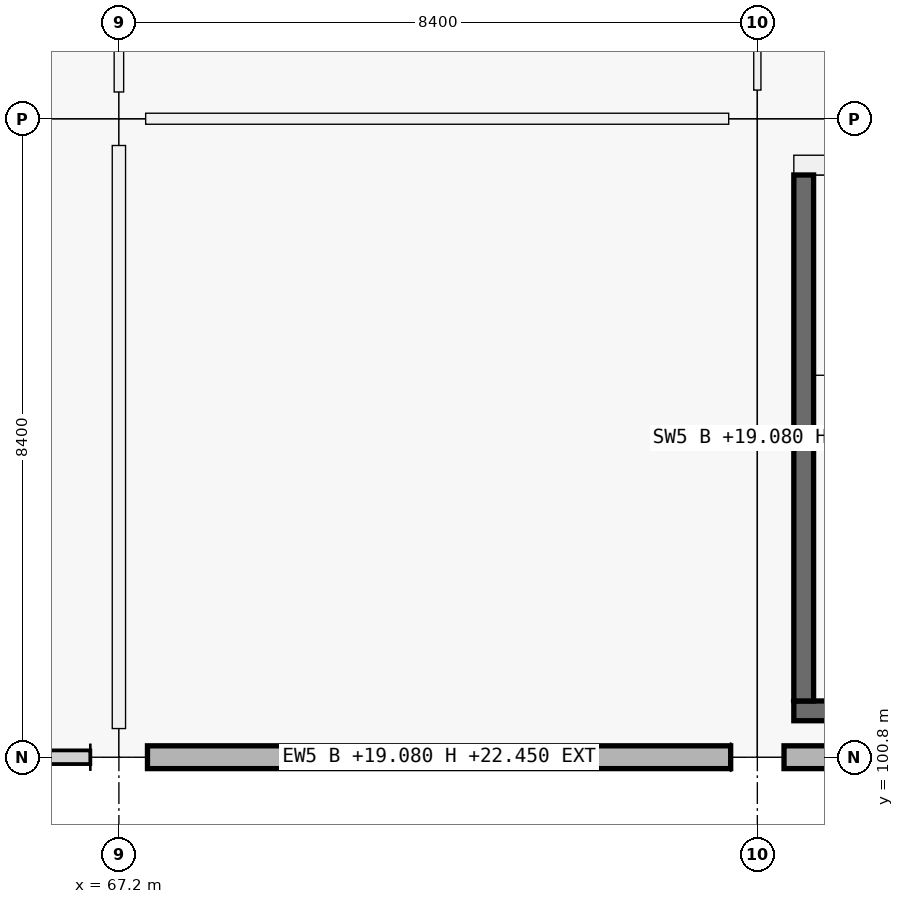
"""IFC4 building model, lengths in metres.
Left out: names, types, materials, properties, quantities, classifications, styles, units other than length and angle.
Written with IfcOpenShell. Run it as: python <this file> out.ifc"""

import sys

from ifc_helpers import new_model, si_unit, direction, frame, frame_2d, origin, origin_2d, place, context, subcontext, project, spatial, rectangle, extrude, element, fill, save


model = new_model("IFC4")
c1 = context("Model", 3, precision=1e-05, world=origin(), true_north=direction((0.0, 1.0)))
c2 = subcontext(c1, "Body", "Model", "MODEL_VIEW")
j1 = project(units=[si_unit("LENGTHUNIT", "METRE"), si_unit("PLANEANGLEUNIT", "RADIAN")], contexts=[c1])
p1 = place(None, origin())
s1 = spatial("IfcSite", under=j1, at=p1, CompositionType="ELEMENT")
p2 = place(p1, origin())
s2 = spatial("IfcBuilding", under=s1, at=p2, CompositionType="ELEMENT")
p3 = place(p2, frame((0.0, 0.0, 19.08)))
s3 = spatial("IfcBuildingStorey", under=s2, at=p3, CompositionType="ELEMENT", Elevation=19.08)
p4 = place(p3, frame((67.2, 100.8, 0.0), z_axis=(0.0, 0.0, 1.0), x_axis=(1.0, 0.0, 0.0)))
e1 = element("IfcColumn", 1, at=p4, inside=s3, PredefinedType="COLUMN", context=c2, shape_type="SweptSolid", body=[
    extrude(rectangle(XDim=0.75, YDim=0.75, at=origin_2d()), origin(), (0.0, 0.0, 1.0), 4.32),
])
for number, where, z_axis, x_axis in (
    (2, (67.2, 109.2, 0.0), (0.0, 0.0, 1.0), (1.0, 0.0, 0.0)),
    (3, (75.6, 100.8, 0.0), (0.0, 0.0, 1.0), (1.0, 0.0, 0.0)),
):
    element("IfcColumn", number, at=place(p3, frame(where, z_axis=z_axis, x_axis=x_axis)), inside=s3, PredefinedType="COLUMN", context=c2, shape_type="SweptSolid", body=[
        extrude(rectangle(XDim=0.7, YDim=0.7, at=origin_2d()), origin(), (0.0, 0.0, 1.0), 4.32),
    ])
p5 = place(p3, frame((75.6, 109.2, 0.0), z_axis=(0.0, 0.0, 1.0), x_axis=(1.0, 0.0, 0.0)))
e4 = element("IfcColumn", 4, at=p5, inside=s3, PredefinedType="COLUMN", context=c2, shape_type="SweptSolid", body=[
    extrude(rectangle(XDim=0.75, YDim=0.75, at=origin_2d()), origin(), (0.0, 0.0, 1.0), 4.32),
])
p6 = place(p3, frame((75.249, 100.8, 0.0), z_axis=(0.0, 0.0, 1.0), x_axis=(-1.0, 0.0, 0.0)))
e5 = element("IfcWall", 5, at=p6, inside=s3, PredefinedType="SOLIDWALL", context=c2, shape_type="SweptSolid", body=[
    extrude(rectangle(XDim=7.673, YDim=0.3, at=frame_2d((3.836, 0.0))), origin(), (0.0, 0.0, 1.0), 3.37),
])
p7 = place(p6, frame((2.962, 0.0, 0.9)))
e6 = element("IfcOpeningElement", 6, at=p7, cuts=e5, PredefinedType="OPENING", context=c2, shape_type="SweptSolid", body=[
    extrude(rectangle(XDim=1.75, YDim=1.95, at=frame_2d((0.875, 0.975))), frame((0.0, 0.15, 0.0), z_axis=(0.0, -1.0, 0.0), x_axis=(1.0, 0.0, 0.0)), (0.0, 0.0, 1.0), 0.3),
])
p8 = place(p3, frame((83.624, 100.8, 0.0), z_axis=(0.0, 0.0, 1.0), x_axis=(-1.0, 0.0, 0.0)))
e7 = element("IfcWall", 7, at=p8, inside=s3, PredefinedType="SOLIDWALL", context=c2, shape_type="SweptSolid", body=[
    extrude(rectangle(XDim=7.673, YDim=0.3, at=frame_2d((3.836, 0.0))), origin(), (0.0, 0.0, 1.0), 3.37),
])
p9 = place(p3, frame((83.52, 101.41, 0.0), z_axis=(0.0, 0.0, 1.0), x_axis=(-1.0, 0.0, 0.0)))
e8 = element("IfcWall", 8, at=p9, inside=s3, PredefinedType="SHEAR", context=c2, shape_type="SweptSolid", body=[
    extrude(rectangle(XDim=7.44, YDim=0.26, at=frame_2d((3.72, 0.0))), origin(), (0.0, 0.0, 1.0), 4.32),
])
p10 = place(p3, frame((76.21, 101.54, 0.0), z_axis=(0.0, 0.0, 1.0), x_axis=(0.0, 1.0, 0.0)))
e9 = element("IfcWall", 9, at=p10, inside=s3, PredefinedType="SHEAR", context=c2, shape_type="SweptSolid", body=[
    extrude(rectangle(XDim=6.92, YDim=0.26, at=frame_2d((3.46, 0.0))), origin(), (0.0, 0.0, 1.0), 4.32),
])
p11 = place(p3, frame((76.08, 108.59, 0.0), z_axis=(0.0, 0.0, 1.0), x_axis=(1.0, 0.0, 0.0)))
e10 = element("IfcWall", 10, at=p11, inside=s3, PredefinedType="SHEAR", context=c2, shape_type="SweptSolid", body=[
    extrude(rectangle(XDim=7.44, YDim=0.26, at=frame_2d((3.72, 0.0))), origin(), (0.0, 0.0, 1.0), 4.32),
])
p12 = place(p3, frame((67.552, 109.2, 0.0), z_axis=(0.0, 0.0, 1.0), x_axis=(1.0, 0.0, 0.0)))
e11 = element("IfcWall", 11, at=p12, inside=s3, PredefinedType="PARTITIONING", context=c2, shape_type="SweptSolid", body=[
    extrude(rectangle(XDim=7.671, YDim=0.145, at=frame_2d((3.835, 0.0))), origin(), (0.0, 0.0, 1.0), 3.19),
])
p13 = place(p3, frame((67.2, 101.177, 0.0), z_axis=(0.0, 0.0, 1.0), x_axis=(0.0, 1.0, 0.0)))
e12 = element("IfcWall", 12, at=p13, inside=s3, PredefinedType="PARTITIONING", context=c2, shape_type="SweptSolid", body=[
    extrude(rectangle(XDim=7.671, YDim=0.175, at=frame_2d((3.835, 0.0))), origin(), (0.0, 0.0, 1.0), 3.19),
])
p14 = place(p13, frame((3.376, 0.0, 0.0)))
e13 = element("IfcOpeningElement", 13, at=p14, cuts=e12, PredefinedType="OPENING", context=c2, shape_type="SweptSolid", body=[
    extrude(rectangle(XDim=0.92, YDim=2.15, at=frame_2d((0.46, 1.075))), frame((0.0, 0.087, 0.0), z_axis=(0.0, -1.0, 0.0), x_axis=(1.0, 0.0, 0.0)), (0.0, 0.0, 1.0), 0.175),
])
p15 = place(p3, frame((67.2, 109.552, 0.0), z_axis=(0.0, 0.0, 1.0), x_axis=(0.0, 1.0, 0.0)))
e14 = element("IfcWall", 14, at=p15, inside=s3, PredefinedType="PARTITIONING", context=c2, shape_type="SweptSolid", body=[
    extrude(rectangle(XDim=7.721, YDim=0.125, at=frame_2d((3.86, 0.0))), origin(), (0.0, 0.0, 1.0), 3.19),
])
p16 = place(p15, frame((0.653, 0.0, 0.0)))
e15 = element("IfcOpeningElement", 15, at=p16, cuts=e14, PredefinedType="OPENING", context=c2, shape_type="SweptSolid", body=[
    extrude(rectangle(XDim=0.92, YDim=2.1, at=frame_2d((0.46, 1.05))), frame((0.0, 0.062, 0.0), z_axis=(0.0, -1.0, 0.0), x_axis=(1.0, 0.0, 0.0)), (0.0, 0.0, 1.0), 0.125),
])
p17 = place(p15, frame((4.543, 0.0, 0.0)))
e16 = element("IfcOpeningElement", 16, at=p17, cuts=e14, PredefinedType="OPENING", context=c2, shape_type="SweptSolid", body=[
    extrude(rectangle(XDim=0.98, YDim=2.08, at=frame_2d((0.49, 1.04))), frame((0.0, 0.062, 0.0), z_axis=(0.0, -1.0, 0.0), x_axis=(1.0, 0.0, 0.0)), (0.0, 0.0, 1.0), 0.125),
])
p18 = place(p3, frame((75.6, 109.577, 0.0), z_axis=(0.0, 0.0, 1.0), x_axis=(0.0, 1.0, 0.0)))
e17 = element("IfcWall", 17, at=p18, inside=s3, PredefinedType="PARTITIONING", context=c2, shape_type="SweptSolid", body=[
    extrude(rectangle(XDim=7.721, YDim=0.095, at=frame_2d((3.861, 0.0))), origin(), (0.0, 0.0, 1.0), 3.19),
])
p19 = place(p7, origin())
e18 = element("IfcWindow", 18, at=p19, inside=s3, PartitioningType="SINGLE_PANEL", PredefinedType="WINDOW", context=c2, shape_type="SweptSolid", body=[
    extrude(rectangle(XDim=1.75, YDim=1.95, at=frame_2d((0.875, 0.975))), frame((0.0, 0.03, 0.0), z_axis=(0.0, -1.0, 0.0), x_axis=(1.0, 0.0, 0.0)), (0.0, 0.0, 1.0), 0.06),
])
fill(e6, e18)
p20 = place(p14, origin())
e19 = element("IfcDoor", 19, at=p20, inside=s3, OperationType="SINGLE_SWING_RIGHT", PredefinedType="DOOR", context=c2, shape_type="SweptSolid", body=[
    extrude(rectangle(XDim=0.92, YDim=2.15, at=frame_2d((0.46, 1.075))), frame((0.0, 0.025, 0.0), z_axis=(0.0, -1.0, 0.0), x_axis=(1.0, 0.0, 0.0)), (0.0, 0.0, 1.0), 0.05),
])
fill(e13, e19)
save(model, sys.argv[1])
